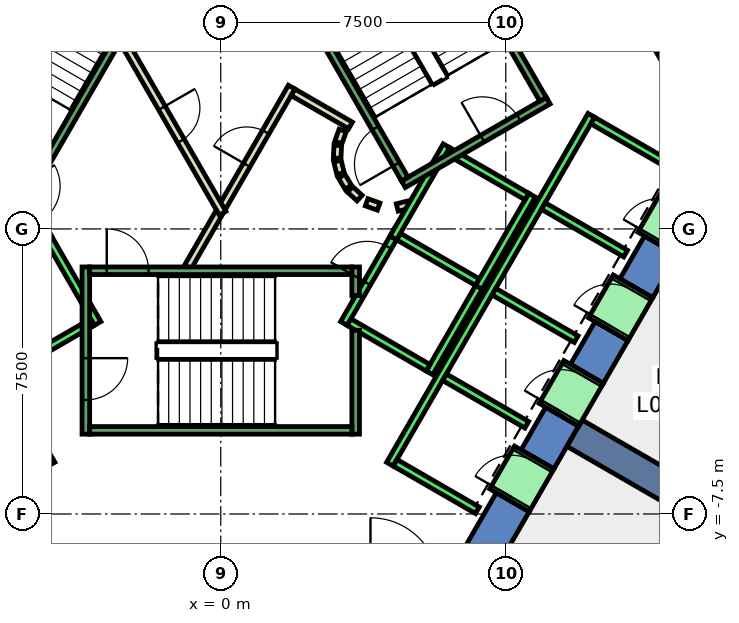
"""IFC4 building model, lengths in metres.
Left out: names, types, materials, properties, quantities, classifications, styles, units other than length and angle.
Written with IfcOpenShell. Run it as: python <this file> out.ifc"""

import sys

from ifc_helpers import new_model, si_unit, direction, frame, frame_2d, origin, place, context, subcontext, project, spatial, polyline, rectangle, outline, extrude, element, fill, save


model = new_model("IFC4")
c1 = context("Model", 3, precision=1e-05, world=origin(), true_north=direction((0.0, 1.0)))
c2 = subcontext(c1, "Body", "Model", "MODEL_VIEW")
j1 = project(units=[si_unit("LENGTHUNIT", "METRE"), si_unit("PLANEANGLEUNIT", "RADIAN")], contexts=[c1])
p1 = place(None, origin())
s1 = spatial("IfcSite", under=j1, at=p1, CompositionType="ELEMENT")
p2 = place(p1, origin())
s2 = spatial("IfcBuilding", under=s1, at=p2, CompositionType="ELEMENT")
p3 = place(p2, frame((0.0, 0.0, 180.2)))
s3 = spatial("IfcBuildingStorey", under=s2, at=p3, CompositionType="ELEMENT", Elevation=180.2)
p4 = place(p3, frame((0.0, 0.0, -0.4)))
e1 = element("IfcWall", 1, at=p4, inside=s3, PredefinedType="SHEAR", context=c2, shape_type="SweptSolid", body=[
    extrude(outline(polyline([(8.517, 11.748), (7.651, 11.248), (12.702, 2.5), (13.856, 2.5), (8.517, 11.748)])), origin(), (0.0, 0.0, 1.0), 4.0),
])
p5 = place(p3, frame((0.0, 0.0, -0.4)))
e2 = element("IfcWall", 2, at=p5, inside=s3, PredefinedType="SHEAR", context=c2, shape_type="SweptSolid", body=[
    extrude(outline(polyline([(8.117, -7.44), (7.252, -6.94), (6.351, -8.5), (6.928, -9.5), (8.117, -7.44)])), origin(), (0.0, 0.0, 1.0), 4.0),
])
p6 = place(p3, frame((0.0, 0.0, -0.4)))
e3 = element("IfcWall", 3, at=p6, inside=s3, PredefinedType="SHEAR", context=c2, shape_type="SweptSolid", body=[
    extrude(outline(polyline([(9.417, -5.189), (8.551, -4.689), (7.902, -5.814), (8.767, -6.314), (9.417, -5.189)])), origin(), (0.0, 0.0, 1.0), 4.0),
])
p7 = place(p3, frame((0.0, 0.0, -0.4)))
e4 = element("IfcWall", 4, at=p7, inside=s3, PredefinedType="SHEAR", context=c2, shape_type="SweptSolid", body=[
    extrude(outline(polyline([(10.717, -2.937), (9.851, -2.437), (9.201, -3.563), (10.067, -4.063), (10.717, -2.937)])), origin(), (0.0, 0.0, 1.0), 4.0),
])
p8 = place(p3, frame((0.0, 0.0, -0.4)))
e5 = element("IfcWall", 5, at=p8, inside=s3, PredefinedType="SHEAR", context=c2, shape_type="SweptSolid", body=[
    extrude(outline(polyline([(12.017, -0.686), (11.151, -0.186), (10.501, -1.311), (11.367, -1.811), (12.017, -0.686)])), origin(), (0.0, 0.0, 1.0), 4.0),
])
p9 = place(p3, frame((9.31, -5.375, -0.4), z_axis=(0.0, 0.0, 1.0), x_axis=(0.866017533419, -0.500013631625, 0.0)))
e6 = element("IfcWall", 6, at=p9, inside=s3, PredefinedType="SHEAR", context=c2, shape_type="SweptSolid", body=[
    extrude(rectangle(XDim=9.0, YDim=0.8, at=frame_2d((4.5, 0.0))), origin(), (0.0, 0.0, 1.0), 4.0),
])
p10 = place(p3, frame((-0.866, -1.0, 0.0), z_axis=(0.0, 0.0, 1.0), x_axis=(0.500033287521, 0.866006184372, 0.0)))
e7 = element("IfcWall", 7, at=p10, inside=s3, PredefinedType="PARTITIONING", context=c2, shape_type="SweptSolid", body=[
    extrude(rectangle(XDim=1.632, YDim=0.2, at=frame_2d((0.816, 0.0))), origin(), (0.0, 0.0, 1.0), 3.6),
])
p11 = place(p3, frame((0.05, 0.587, 0.0), z_axis=(0.0, 0.0, 1.0), x_axis=(0.500028932171, 0.866008699143, 0.0)))
e8 = element("IfcWall", 8, at=p11, inside=s3, PredefinedType="PARTITIONING", context=c2, shape_type="SweptSolid", body=[
    extrude(rectangle(XDim=3.632, YDim=0.2, at=frame_2d((1.816, 0.0))), origin(), (0.0, 0.0, 1.0), 3.6),
])
p12 = place(p11, frame((1.266, 0.0, 0.0)))
e9 = element("IfcOpeningElement", 9, at=p12, cuts=e8, PredefinedType="OPENING", context=c2, shape_type="SweptSolid", body=[
    extrude(rectangle(XDim=1.0, YDim=2.1, at=frame_2d((0.5, 1.05))), frame((0.0, 0.11, 0.0), z_axis=(0.0, -1.0, 0.0), x_axis=(1.0, 0.0, 0.0)), (0.0, 0.0, 1.0), 0.22),
])
p13 = place(p3, frame((1.903, 3.595, 0.0), z_axis=(0.0, 0.0, 1.0), x_axis=(0.866239139897, -0.499629615326, 0.0)))
e10 = element("IfcWall", 10, at=p13, inside=s3, PredefinedType="PARTITIONING", context=c2, shape_type="SweptSolid", body=[
    extrude(rectangle(XDim=1.745, YDim=0.2, at=frame_2d((0.873, 0.0))), origin(), (0.0, 0.0, 1.0), 3.6),
])
p14 = place(p3, frame((3.208, 2.592, 0.0), z_axis=(0.0, 0.0, 1.0), x_axis=(-0.337388820924, -0.941365382578, 0.0)))
e11 = element("IfcWall", 11, at=p14, inside=s3, PredefinedType="PARTITIONING", context=c2, shape_type="SweptSolid", body=[
    extrude(rectangle(XDim=0.338, YDim=0.2, at=frame_2d((0.169, 0.0))), origin(), (0.0, 0.0, 1.0), 3.6),
])
p15 = place(p3, frame((3.079, 2.199, 0.0), z_axis=(0.0, 0.0, 1.0), x_axis=(-0.047771483479, -0.998858290933, 0.0)))
e12 = element("IfcWall", 12, at=p15, inside=s3, PredefinedType="PARTITIONING", context=c2, shape_type="SweptSolid", body=[
    extrude(rectangle(XDim=0.337, YDim=0.2, at=frame_2d((0.169, 0.0))), origin(), (0.0, 0.0, 1.0), 3.6),
])
p16 = place(p3, frame((3.07, 1.786, 0.0), z_axis=(0.0, 0.0, 1.0), x_axis=(0.242705583207, -0.970099994784, 0.0)))
e13 = element("IfcWall", 13, at=p16, inside=s3, PredefinedType="PARTITIONING", context=c2, shape_type="SweptSolid", body=[
    extrude(rectangle(XDim=0.338, YDim=0.2, at=frame_2d((0.169, 0.0))), origin(), (0.0, 0.0, 1.0), 3.6),
])
for number, where, z_axis, x_axis in (
    (14, (3.182, 1.388, 0.0), (0.0, 0.0, 1.0), (0.512, -0.859, 0.0)),
    (15, (3.404, 1.039, 0.0), (0.0, 0.0, 1.0), (0.74, -0.672, 0.0)),
):
    element("IfcWall", number, at=place(p3, frame(where, z_axis=z_axis, x_axis=x_axis)), inside=s3, PredefinedType="PARTITIONING", context=c2, shape_type="SweptSolid", body=[
        extrude(rectangle(XDim=0.338, YDim=0.2, at=frame_2d((0.169, 0.0))), origin(), (0.0, 0.0, 1.0), 3.6),
    ])
p17 = place(p3, frame((3.838, 0.702, 0.0), z_axis=(0.0, 0.0, 1.0), x_axis=(0.941035081519, -0.338308993895, 0.0)))
e16 = element("IfcWall", 16, at=p17, inside=s3, PredefinedType="PARTITIONING", context=c2, shape_type="SweptSolid", body=[
    extrude(rectangle(XDim=0.337, YDim=0.2, at=frame_2d((0.168, 0.0))), origin(), (0.0, 0.0, 1.0), 3.6),
])
p18 = place(p3, frame((4.644, 0.564, 0.0), z_axis=(0.0, 0.0, 1.0), x_axis=(0.970004408322, 0.243087325534, 0.0)))
e17 = element("IfcWall", 17, at=p18, inside=s3, PredefinedType="PARTITIONING", context=c2, shape_type="SweptSolid", body=[
    extrude(rectangle(XDim=0.312, YDim=0.2, at=frame_2d((0.156, 0.0))), origin(), (0.0, 0.0, 1.0), 3.6),
])
p19 = place(p3, frame((-2.598, 5.0, 0.0), z_axis=(0.0, 0.0, 1.0), x_axis=(0.49995654735, -0.86605048973, 0.0)))
e18 = element("IfcWall", 18, at=p19, inside=s3, PredefinedType="PARTITIONING", context=c2, shape_type="SweptSolid", body=[
    extrude(rectangle(XDim=5.296, YDim=0.2, at=frame_2d((2.648, 0.0))), origin(), (0.0, 0.0, 1.0), 3.6),
])
p20 = place(p19, frame((2.098, 0.0, 0.0)))
e19 = element("IfcOpeningElement", 19, at=p20, cuts=e18, PredefinedType="OPENING", context=c2, shape_type="SweptSolid", body=[
    extrude(rectangle(XDim=1.0, YDim=2.1, at=frame_2d((0.5, 1.05))), frame((0.0, 0.11, 0.0), z_axis=(0.0, -1.0, 0.0), x_axis=(1.0, 0.0, 0.0)), (0.0, 0.0, 1.0), 0.22),
])
p21 = place(p3, frame((12.476, -7.491, 0.0), z_axis=(0.0, 0.0, 1.0), x_axis=(-0.499989258007, -0.866031605588, 0.0)))
e20 = element("IfcWall", 20, at=p21, inside=s3, PredefinedType="PARTITIONING", context=c2, shape_type="SweptSolid", body=[
    extrude(rectangle(XDim=9.452, YDim=0.2, at=frame_2d((4.726, 0.0))), origin(), (0.0, 0.0, 1.0), 3.6),
])
p22 = place(p3, frame((-9.751, 2.99, 0.0), z_axis=(0.0, 0.0, 1.0), x_axis=(0.50000090737, -0.866024879913, 0.0)))
e21 = element("IfcWall", 21, at=p22, inside=s3, PredefinedType="STANDARD", context=c2, shape_type="SweptSolid", body=[
    extrude(rectangle(XDim=10.6, YDim=0.2, at=frame_2d((5.3, 0.0))), origin(), (0.0, 0.0, 1.0), 3.6),
])
p23 = place(p3, frame((3.24, -2.488, 0.0), z_axis=(0.0, 0.0, 1.0), x_axis=(0.49994636267, 0.866056369097, 0.0)))
e22 = element("IfcWall", 22, at=p23, inside=s3, PredefinedType="STANDARD", context=c2, shape_type="SweptSolid", body=[
    extrude(rectangle(XDim=2.8, YDim=0.2, at=frame_2d((1.4, 0.0))), origin(), (0.0, 0.0, 1.0), 3.6),
])
p24 = place(p23, frame((1.225, 0.0, 0.0)))
e23 = element("IfcOpeningElement", 23, at=p24, cuts=e22, PredefinedType="OPENING", context=c2, shape_type="SweptSolid", body=[
    extrude(rectangle(XDim=1.1, YDim=2.1, at=frame_2d((0.55, 1.05))), frame((0.0, 0.11, 0.0), z_axis=(0.0, -1.0, 0.0), x_axis=(1.0, 0.0, 0.0)), (0.0, 0.0, 1.0), 0.22),
])
p25 = place(p3, frame((5.492, -3.788, 0.0), z_axis=(0.0, 0.0, 1.0), x_axis=(0.500011755427, 0.866018616679, 0.0)))
e24 = element("IfcWall", 24, at=p25, inside=s3, PredefinedType="STANDARD", context=c2, shape_type="SweptSolid", body=[
    extrude(rectangle(XDim=2.8, YDim=0.2, at=frame_2d((1.4, 0.0))), origin(), (0.0, 0.0, 1.0), 3.6),
])
p26 = place(p3, frame((3.377, -2.452, 0.0), z_axis=(0.0, 0.0, 1.0), x_axis=(0.865955154139, -0.50012165622, 0.0)))
e25 = element("IfcWall", 25, at=p26, inside=s3, PredefinedType="STANDARD", context=c2, shape_type="SweptSolid", body=[
    extrude(rectangle(XDim=2.4, YDim=0.2, at=frame_2d((1.2, 0.0))), origin(), (0.0, 0.0, 1.0), 3.6),
])
p27 = place(p3, frame((4.677, -0.2, 0.0), z_axis=(0.0, 0.0, 1.0), x_axis=(0.865973769406, -0.500089422704, 0.0)))
e26 = element("IfcWall", 26, at=p27, inside=s3, PredefinedType="STANDARD", context=c2, shape_type="SweptSolid", body=[
    extrude(rectangle(XDim=2.399, YDim=0.2, at=frame_2d((1.2, 0.0))), origin(), (0.0, 0.0, 1.0), 3.6),
])
p28 = place(p3, frame((4.451, -6.19, 0.0), z_axis=(0.0, 0.0, 1.0), x_axis=(0.50000090737, 0.866024879913, 0.0)))
e27 = element("IfcWall", 27, at=p28, inside=s3, PredefinedType="STANDARD", context=c2, shape_type="SweptSolid", body=[
    extrude(rectangle(XDim=10.6, YDim=0.2, at=frame_2d((5.3, 0.0))), origin(), (0.0, 0.0, 1.0), 3.6),
])
for number, where, z_axis, x_axis in (
    (28, (4.588, -6.153, 0.0), (0.0, 0.0, 1.0), (0.866, -0.5, 0.0)),
    (29, (5.888, -3.902, 0.0), (0.0, 0.0, 1.0), (0.866, -0.5, 0.0)),
    (30, (7.188, -1.65, 0.0), (0.0, 0.0, 1.0), (0.866, -0.5, 0.0)),
    (31, (8.488, 0.602, 0.0), (0.0, 0.0, 1.0), (0.866, -0.5, 0.0)),
):
    element("IfcWall", number, at=place(p3, frame(where, z_axis=z_axis, x_axis=x_axis)), inside=s3, PredefinedType="STANDARD", context=c2, shape_type="SweptSolid", body=[
        extrude(rectangle(XDim=2.5, YDim=0.2, at=frame_2d((1.25, 0.0))), origin(), (0.0, 0.0, 1.0), 3.6),
    ])
p29 = place(p3, frame((9.788, 2.853, 0.0), z_axis=(0.0, 0.0, 1.0), x_axis=(0.865998541277, -0.500046524342, 0.0)))
e32 = element("IfcWall", 32, at=p29, inside=s3, PredefinedType="STANDARD", context=c2, shape_type="SweptSolid", body=[
    extrude(rectangle(XDim=2.5, YDim=0.2, at=frame_2d((1.25, 0.0))), origin(), (0.0, 0.0, 1.0), 3.6),
])
p30 = place(p3, frame((7.598, -7.14, 0.0), z_axis=(0.0, 0.0, 1.0), x_axis=(0.500362116554, 0.865816234728, 0.0)))
e33 = element("IfcWall", 33, at=p30, inside=s3, PredefinedType="STANDARD", context=c2, shape_type="SweptSolid", body=[
    extrude(rectangle(XDim=1.299, YDim=1.2, at=frame_2d((0.65, 0.0))), origin(), (0.0, 0.0, 1.0), 2.4),
])
p31 = place(p30, frame((0.1, 0.0, 0.0)))
e34 = element("IfcOpeningElement", 34, at=p31, cuts=e33, PredefinedType="OPENING", context=c2, shape_type="SweptSolid", body=[
    extrude(rectangle(XDim=1.1, YDim=2.3, at=frame_2d((0.55, 1.15))), frame((0.0, 0.61, 0.0), z_axis=(0.0, -1.0, 0.0), x_axis=(1.0, 0.0, 0.0)), (0.0, 0.0, 1.0), 1.22),
])
p32 = place(p3, frame((8.898, -4.889, 0.0), z_axis=(0.0, 0.0, 1.0), x_axis=(0.500036693733, 0.866004217611, 0.0)))
e35 = element("IfcWall", 35, at=p32, inside=s3, PredefinedType="STANDARD", context=c2, shape_type="SweptSolid", body=[
    extrude(rectangle(XDim=1.3, YDim=1.2, at=frame_2d((0.65, 0.0))), origin(), (0.0, 0.0, 1.0), 2.4),
])
p33 = place(p32, frame((0.1, 0.0, 0.0)))
e36 = element("IfcOpeningElement", 36, at=p33, cuts=e35, PredefinedType="OPENING", context=c2, shape_type="SweptSolid", body=[
    extrude(rectangle(XDim=1.1, YDim=2.3, at=frame_2d((0.55, 1.15))), frame((0.0, 0.61, 0.0), z_axis=(0.0, -1.0, 0.0), x_axis=(1.0, 0.0, 0.0)), (0.0, 0.0, 1.0), 1.22),
])
p34 = place(p3, frame((10.198, -2.637, 0.0), z_axis=(0.0, 0.0, 1.0), x_axis=(0.49989585183, 0.866085525409, 0.0)))
e37 = element("IfcWall", 37, at=p34, inside=s3, PredefinedType="STANDARD", context=c2, shape_type="SweptSolid", body=[
    extrude(rectangle(XDim=1.3, YDim=1.2, at=frame_2d((0.65, 0.0))), origin(), (0.0, 0.0, 1.0), 2.4),
])
p35 = place(p34, frame((0.1, 0.0, 0.0)))
e38 = element("IfcOpeningElement", 38, at=p35, cuts=e37, PredefinedType="OPENING", context=c2, shape_type="SweptSolid", body=[
    extrude(rectangle(XDim=1.1, YDim=2.3, at=frame_2d((0.55, 1.15))), frame((0.0, 0.61, 0.0), z_axis=(0.0, -1.0, 0.0), x_axis=(1.0, 0.0, 0.0)), (0.0, 0.0, 1.0), 1.22),
])
p36 = place(p3, frame((11.498, -0.385, 0.0), z_axis=(0.0, 0.0, 1.0), x_axis=(0.500221244143, 0.865897630733, 0.0)))
e39 = element("IfcWall", 39, at=p36, inside=s3, PredefinedType="STANDARD", context=c2, shape_type="SweptSolid", body=[
    extrude(rectangle(XDim=1.299, YDim=1.2, at=frame_2d((0.65, 0.0))), origin(), (0.0, 0.0, 1.0), 2.4),
])
p37 = place(p36, frame((0.1, 0.0, 0.0)))
e40 = element("IfcOpeningElement", 40, at=p37, cuts=e39, PredefinedType="OPENING", context=c2, shape_type="SweptSolid", body=[
    extrude(rectangle(XDim=1.1, YDim=2.3, at=frame_2d((0.55, 1.15))), frame((0.0, 0.61, 0.0), z_axis=(0.0, -1.0, 0.0), x_axis=(1.0, 0.0, 0.0)), (0.0, 0.0, 1.0), 1.22),
])
for number, where, z_axis, x_axis in (
    (41, (4.54, -0.237, 0.0), (0.0, 0.0, 1.0), (0.5, 0.866, 0.0)),
    (42, (6.792, -1.537, 0.0), (0.0, 0.0, 1.0), (0.5, 0.866, 0.0)),
):
    element("IfcWall", number, at=place(p3, frame(where, z_axis=z_axis, x_axis=x_axis)), inside=s3, PredefinedType="STANDARD", context=c2, shape_type="SweptSolid", body=[
        extrude(rectangle(XDim=2.8, YDim=0.2, at=frame_2d((1.4, 0.0))), origin(), (0.0, 0.0, 1.0), 2.3),
    ])
p38 = place(p3, frame((5.977, 2.052, 0.0), z_axis=(0.0, 0.0, 1.0), x_axis=(0.865973769406, -0.500089422704, 0.0)))
e43 = element("IfcWall", 43, at=p38, inside=s3, PredefinedType="STANDARD", context=c2, shape_type="SweptSolid", body=[
    extrude(rectangle(XDim=2.399, YDim=0.2, at=frame_2d((1.2, 0.0))), origin(), (0.0, 0.0, 1.0), 2.3),
])
p39 = place(p3, frame((-4.64, -0.063, 0.0), z_axis=(0.0, 0.0, 1.0), x_axis=(0.49994636267, -0.866056369097, 0.0)))
e44 = element("IfcWall", 44, at=p39, inside=s3, PredefinedType="STANDARD", context=c2, shape_type="SweptSolid", body=[
    extrude(rectangle(XDim=2.8, YDim=0.2, at=frame_2d((1.4, 0.0))), origin(), (0.0, 0.0, 1.0), 2.3),
])
p40 = place(p3, frame((-3.377, -2.452, 0.0), z_axis=(0.0, 0.0, 1.0), x_axis=(-0.865955154139, -0.50012165622, 0.0)))
e45 = element("IfcWall", 45, at=p40, inside=s3, PredefinedType="STANDARD", context=c2, shape_type="SweptSolid", body=[
    extrude(rectangle(XDim=2.4, YDim=0.2, at=frame_2d((1.2, 0.0))), origin(), (0.0, 0.0, 1.0), 2.3),
])
p41 = place(p3, frame((-3.55, -1.0, 0.0), z_axis=(0.0, 0.0, 1.0), x_axis=(0.0, -1.0, 0.0)))
e46 = element("IfcWall", 46, at=p41, inside=s3, PredefinedType="STANDARD", context=c2, shape_type="SweptSolid", body=[
    extrude(rectangle(XDim=4.4, YDim=0.2, at=frame_2d((2.2, 0.0))), origin(), (0.0, 0.0, 1.0), 3.6),
])
p42 = place(p41, frame((2.4, 0.0, 0.0)))
e47 = element("IfcOpeningElement", 47, at=p42, cuts=e46, PredefinedType="OPENING", context=c2, shape_type="SweptSolid", body=[
    extrude(rectangle(XDim=1.1, YDim=2.2, at=frame_2d((0.55, 1.1))), frame((0.0, 0.11, 0.0), z_axis=(0.0, -1.0, 0.0), x_axis=(1.0, 0.0, 0.0)), (0.0, 0.0, 1.0), 0.22),
])
p43 = place(p3, frame((3.55, -2.667, 0.0), z_axis=(0.0, 0.0, 1.0), x_axis=(0.0, -1.0, 0.0)))
e48 = element("IfcWall", 48, at=p43, inside=s3, PredefinedType="STANDARD", context=c2, shape_type="SweptSolid", body=[
    extrude(rectangle(XDim=2.733, YDim=0.2, at=frame_2d((1.366, 0.0))), origin(), (0.0, 0.0, 1.0), 3.6),
])
p44 = place(p3, frame((3.55, -1.0, 0.0), z_axis=(0.0, 0.0, 1.0), x_axis=(0.0, -1.0, 0.0)))
e49 = element("IfcWall", 49, at=p44, inside=s3, PredefinedType="STANDARD", context=c2, shape_type="SweptSolid", body=[
    extrude(rectangle(XDim=0.751, YDim=0.2, at=frame_2d((0.375, 0.0))), origin(), (0.0, 0.0, 1.0), 3.6),
])
p45 = place(p3, frame((-3.45, -1.1, 0.0), z_axis=(0.0, 0.0, 1.0), x_axis=(1.0, 0.0, 0.0)))
e50 = element("IfcWall", 50, at=p45, inside=s3, PredefinedType="STANDARD", context=c2, shape_type="SweptSolid", body=[
    extrude(rectangle(XDim=6.9, YDim=0.2, at=frame_2d((3.45, 0.0))), origin(), (0.0, 0.0, 1.0), 3.6),
])
p46 = place(p45, frame((0.45, 0.0, 0.0)))
e51 = element("IfcOpeningElement", 51, at=p46, cuts=e50, PredefinedType="OPENING", context=c2, shape_type="SweptSolid", body=[
    extrude(rectangle(XDim=1.1, YDim=2.2, at=frame_2d((0.55, 1.1))), frame((0.0, 0.11, 0.0), z_axis=(0.0, -1.0, 0.0), x_axis=(1.0, 0.0, 0.0)), (0.0, 0.0, 1.0), 0.22),
])
p47 = place(p3, frame((-3.45, -5.3, 0.0), z_axis=(0.0, 0.0, 1.0), x_axis=(1.0, 0.0, 0.0)))
e52 = element("IfcWall", 52, at=p47, inside=s3, PredefinedType="STANDARD", context=c2, shape_type="SweptSolid", body=[
    extrude(rectangle(XDim=6.9, YDim=0.2, at=frame_2d((3.45, 0.0))), origin(), (0.0, 0.0, 1.0), 3.6),
])
p48 = place(p3, frame((4.806, 1.176, 0.0), z_axis=(0.0, 0.0, 1.0), x_axis=(0.866059941101, 0.499940174841, 0.0)))
e53 = element("IfcWall", 53, at=p48, inside=s3, PredefinedType="STANDARD", context=c2, shape_type="SweptSolid", body=[
    extrude(rectangle(XDim=4.4, YDim=0.2, at=frame_2d((2.2, 0.0))), origin(), (0.0, 0.0, 1.0), 3.6),
])
p49 = place(p48, frame((2.4, 0.0, 0.0)))
e54 = element("IfcOpeningElement", 54, at=p49, cuts=e53, PredefinedType="OPENING", context=c2, shape_type="SweptSolid", body=[
    extrude(rectangle(XDim=1.1, YDim=2.2, at=frame_2d((0.55, 1.1))), frame((0.0, 0.11, 0.0), z_axis=(0.0, -1.0, 0.0), x_axis=(1.0, 0.0, 0.0)), (0.0, 0.0, 1.0), 0.22),
])
p50 = place(p3, frame((4.843, 1.312, 0.0), z_axis=(0.0, 0.0, 1.0), x_axis=(-0.499963383562, 0.866046543262, 0.0)))
e55 = element("IfcWall", 55, at=p50, inside=s3, PredefinedType="STANDARD", context=c2, shape_type="SweptSolid", body=[
    extrude(rectangle(XDim=6.9, YDim=0.2, at=frame_2d((3.45, 0.0))), origin(), (0.0, 0.0, 1.0), 3.6),
])
p51 = place(p50, frame((0.45, 0.0, 0.0)))
e56 = element("IfcOpeningElement", 56, at=p51, cuts=e55, PredefinedType="OPENING", context=c2, shape_type="SweptSolid", body=[
    extrude(rectangle(XDim=1.1, YDim=2.2, at=frame_2d((0.55, 1.1))), frame((0.0, 0.11, 0.0), z_axis=(0.0, -1.0, 0.0), x_axis=(1.0, 0.0, 0.0)), (0.0, 0.0, 1.0), 0.22),
])
p52 = place(p3, frame((8.48, 3.412, 0.0), z_axis=(0.0, 0.0, 1.0), x_axis=(-0.499978703459, 0.866037698999, 0.0)))
e57 = element("IfcWall", 57, at=p52, inside=s3, PredefinedType="STANDARD", context=c2, shape_type="SweptSolid", body=[
    extrude(rectangle(XDim=6.9, YDim=0.2, at=frame_2d((3.45, 0.0))), origin(), (0.0, 0.0, 1.0), 3.6),
])
p53 = place(p3, frame((-1.393, 7.288, 0.0), z_axis=(0.0, 0.0, 1.0), x_axis=(-0.499963383562, -0.866046543262, 0.0)))
e58 = element("IfcWall", 58, at=p53, inside=s3, PredefinedType="STANDARD", context=c2, shape_type="SweptSolid", body=[
    extrude(rectangle(XDim=6.9, YDim=0.2, at=frame_2d((3.45, 0.0))), origin(), (0.0, 0.0, 1.0), 3.6),
])
p54 = place(p53, frame((0.45, 0.0, 0.0)))
e59 = element("IfcOpeningElement", 59, at=p54, cuts=e58, PredefinedType="OPENING", context=c2, shape_type="SweptSolid", body=[
    extrude(rectangle(XDim=1.1, YDim=2.2, at=frame_2d((0.55, 1.1))), frame((0.0, 0.11, 0.0), z_axis=(0.0, -1.0, 0.0), x_axis=(1.0, 0.0, 0.0)), (0.0, 0.0, 1.0), 0.22),
])
p55 = place(p12, origin())
e60 = element("IfcDoor", 60, at=p55, inside=s3, OperationType="SINGLE_SWING_RIGHT", PredefinedType="DOOR", context=c2, shape_type="SweptSolid", body=[
    extrude(rectangle(XDim=1.0, YDim=2.1, at=frame_2d((0.5, 1.05))), frame((0.0, 0.025, 0.0), z_axis=(0.0, -1.0, 0.0), x_axis=(1.0, 0.0, 0.0)), (0.0, 0.0, 1.0), 0.05),
])
fill(e9, e60)
p56 = place(p20, origin())
e61 = element("IfcDoor", 61, at=p56, inside=s3, OperationType="SINGLE_SWING_RIGHT", PredefinedType="DOOR", context=c2, shape_type="SweptSolid", body=[
    extrude(rectangle(XDim=1.0, YDim=2.1, at=frame_2d((0.5, 1.05))), frame((0.0, 0.025, 0.0), z_axis=(0.0, -1.0, 0.0), x_axis=(1.0, 0.0, 0.0)), (0.0, 0.0, 1.0), 0.05),
])
fill(e19, e61)
p57 = place(p31, origin())
e62 = element("IfcDoor", 62, at=p57, inside=s3, OperationType="SLIDING_TO_LEFT", PredefinedType="DOOR", context=c2, shape_type="SweptSolid", body=[
    extrude(rectangle(XDim=1.1, YDim=2.3, at=frame_2d((0.55, 1.15))), frame((0.0, 0.025, 0.0), z_axis=(0.0, -1.0, 0.0), x_axis=(1.0, 0.0, 0.0)), (0.0, 0.0, 1.0), 0.05),
])
fill(e34, e62)
p58 = place(p33, origin())
e63 = element("IfcDoor", 63, at=p58, inside=s3, OperationType="SLIDING_TO_LEFT", PredefinedType="DOOR", context=c2, shape_type="SweptSolid", body=[
    extrude(rectangle(XDim=1.1, YDim=2.3, at=frame_2d((0.55, 1.15))), frame((0.0, 0.025, 0.0), z_axis=(0.0, -1.0, 0.0), x_axis=(1.0, 0.0, 0.0)), (0.0, 0.0, 1.0), 0.05),
])
fill(e36, e63)
p59 = place(p35, origin())
e64 = element("IfcDoor", 64, at=p59, inside=s3, OperationType="SLIDING_TO_LEFT", PredefinedType="DOOR", context=c2, shape_type="SweptSolid", body=[
    extrude(rectangle(XDim=1.1, YDim=2.3, at=frame_2d((0.55, 1.15))), frame((0.0, 0.025, 0.0), z_axis=(0.0, -1.0, 0.0), x_axis=(1.0, 0.0, 0.0)), (0.0, 0.0, 1.0), 0.05),
])
fill(e38, e64)
p60 = place(p24, origin())
e65 = element("IfcDoor", 65, at=p60, inside=s3, OperationType="SLIDING_TO_LEFT", PredefinedType="DOOR", context=c2, shape_type="SweptSolid", body=[
    extrude(rectangle(XDim=1.1, YDim=2.1, at=frame_2d((0.55, 1.05))), frame((0.0, 0.025, 0.0), z_axis=(0.0, -1.0, 0.0), x_axis=(1.0, 0.0, 0.0)), (0.0, 0.0, 1.0), 0.05),
])
fill(e23, e65)
p61 = place(p46, origin())
e66 = element("IfcDoor", 66, at=p61, inside=s3, OperationType="SINGLE_SWING_LEFT", PredefinedType="DOOR", context=c2, shape_type="SweptSolid", body=[
    extrude(rectangle(XDim=1.1, YDim=2.2, at=frame_2d((0.55, 1.1))), frame((0.0, 0.025, 0.0), z_axis=(0.0, -1.0, 0.0), x_axis=(1.0, 0.0, 0.0)), (0.0, 0.0, 1.0), 0.05),
])
fill(e51, e66)
p62 = place(p42, origin())
e67 = element("IfcDoor", 67, at=p62, inside=s3, OperationType="SINGLE_SWING_LEFT", PredefinedType="DOOR", context=c2, shape_type="SweptSolid", body=[
    extrude(rectangle(XDim=1.1, YDim=2.2, at=frame_2d((0.55, 1.1))), frame((0.0, 0.025, 0.0), z_axis=(0.0, -1.0, 0.0), x_axis=(1.0, 0.0, 0.0)), (0.0, 0.0, 1.0), 0.05),
])
fill(e47, e67)
p63 = place(p51, origin())
e68 = element("IfcDoor", 68, at=p63, inside=s3, OperationType="SINGLE_SWING_LEFT", PredefinedType="DOOR", context=c2, shape_type="SweptSolid", body=[
    extrude(rectangle(XDim=1.1, YDim=2.2, at=frame_2d((0.55, 1.1))), frame((0.0, 0.025, 0.0), z_axis=(0.0, -1.0, 0.0), x_axis=(1.0, 0.0, 0.0)), (0.0, 0.0, 1.0), 0.05),
])
fill(e56, e68)
p64 = place(p49, origin())
e69 = element("IfcDoor", 69, at=p64, inside=s3, OperationType="SINGLE_SWING_LEFT", PredefinedType="DOOR", context=c2, shape_type="SweptSolid", body=[
    extrude(rectangle(XDim=1.1, YDim=2.2, at=frame_2d((0.55, 1.1))), frame((0.0, 0.025, 0.0), z_axis=(0.0, -1.0, 0.0), x_axis=(1.0, 0.0, 0.0)), (0.0, 0.0, 1.0), 0.05),
])
fill(e54, e69)
save(model, sys.argv[1])
